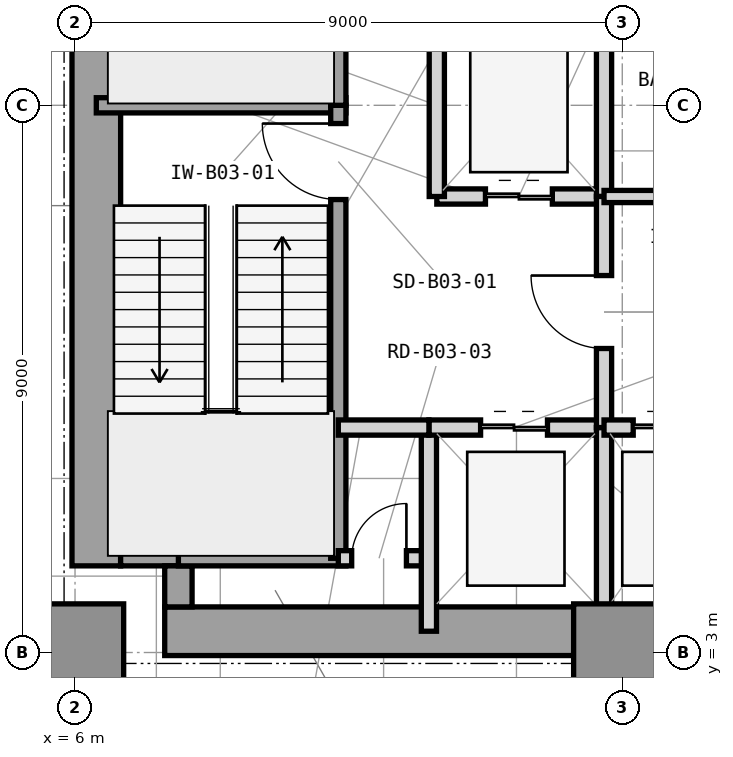
"""IFC4 building model, lengths in metres.
Left out: names, types, materials, properties, quantities, classifications, styles, units other than length and angle.
Written with IfcOpenShell. Run it as: python <this file> out.ifc"""

import sys

from ifc_helpers import new_model, si_unit, direction, frame, frame_2d, origin, origin_2d, place, context, subcontext, project, spatial, rectangle, extrude, element, fill, save


model = new_model("IFC4")
c1 = context("Model", 3, precision=1e-05, world=origin(), true_north=direction((0.0, 1.0)))
c2 = subcontext(c1, "Body", "Model", "MODEL_VIEW")
j1 = project(units=[si_unit("LENGTHUNIT", "METRE"), si_unit("PLANEANGLEUNIT", "RADIAN")], contexts=[c1])
p1 = place(None, origin())
s1 = spatial("IfcSite", under=j1, at=p1, CompositionType="ELEMENT")
p2 = place(p1, origin())
s2 = spatial("IfcBuilding", under=s1, at=p2, CompositionType="ELEMENT")
p3 = place(p2, frame((0.0, 0.0, -13.5)))
s3 = spatial("IfcBuildingStorey", under=s2, at=p3, CompositionType="ELEMENT", Elevation=-13.5)
p4 = place(p3, frame((7.475, 3.35, 0.0), z_axis=(0.0, 0.0, 1.0), x_axis=(1.0, 0.0, 0.0)))
e1 = element("IfcWall", 1, at=p4, inside=s3, PredefinedType="SHEAR", context=c2, shape_type="SweptSolid", body=[
    extrude(rectangle(XDim=16.575, YDim=0.8, at=frame_2d((8.288, 0.0))), origin(), (0.0, 0.0, 1.0), 4.5),
])
p5 = place(p3, frame((6.35, 4.425, 0.0), z_axis=(0.0, 0.0, 1.0), x_axis=(0.0, 1.0, 0.0)))
e2 = element("IfcWall", 2, at=p5, inside=s3, PredefinedType="SHEAR", context=c2, shape_type="SweptSolid", body=[
    extrude(rectangle(XDim=15.15, YDim=0.8, at=frame_2d((7.575, 0.0))), origin(), (0.0, 0.0, 1.0), 4.5),
])
p6 = place(p3, frame((6.75, 4.65, 0.0), z_axis=(0.0, 0.0, 1.0), x_axis=(1.0, 0.0, 0.0)))
e3 = element("IfcWall", 3, at=p6, inside=s3, PredefinedType="SHEAR", context=c2, shape_type="SweptSolid", body=[
    extrude(rectangle(XDim=1.175, YDim=0.45, at=frame_2d((0.587, 0.0))), origin(), (0.0, 0.0, 1.0), 4.5),
])
p7 = place(p3, frame((7.7, 3.75, 0.0), z_axis=(0.0, 0.0, 1.0), x_axis=(0.0, 1.0, 0.0)))
e4 = element("IfcWall", 4, at=p7, inside=s3, PredefinedType="SHEAR", context=c2, shape_type="SweptSolid", body=[
    extrude(rectangle(XDim=0.675, YDim=0.45, at=frame_2d((0.337, 0.0))), origin(), (0.0, 0.0, 1.0), 4.5),
])
for number, where, z_axis, x_axis in (
    (5, (6.0, 3.0, 0.0), (0.0, 0.0, 1.0), (1.0, 0.0, 0.0)),
    (6, (15.0, 3.0, 0.0), (0.0, 0.0, 1.0), (1.0, 0.0, 0.0)),
):
    element("IfcColumn", number, at=place(p3, frame(where, z_axis=z_axis, x_axis=x_axis)), inside=s3, PredefinedType="COLUMN", context=c2, shape_type="SweptSolid", body=[
        extrude(rectangle(XDim=1.6, YDim=1.6, at=origin_2d()), origin(), (0.0, 0.0, 1.0), 4.5),
    ])
p8 = place(p3, frame((6.35, 12.0, 0.0), z_axis=(0.0, 0.0, 1.0), x_axis=(1.0, 0.0, 0.0)))
e7 = element("IfcWall", 7, at=p8, inside=s3, PredefinedType="SHEAR", context=c2, shape_type="SweptSolid", body=[
    extrude(rectangle(XDim=4.105, YDim=0.25, at=frame_2d((2.052, 0.0))), origin(), (0.0, 0.0, 1.0), 4.5),
])
p9 = place(p3, frame((7.7, 4.55, 0.0), z_axis=(0.0, 0.0, 1.0), x_axis=(1.0, 0.0, 0.0)))
e8 = element("IfcWall", 8, at=p9, inside=s3, PredefinedType="SHEAR", context=c2, shape_type="SweptSolid", body=[
    extrude(rectangle(XDim=2.755, YDim=0.25, at=frame_2d((1.377, 0.0))), origin(), (0.0, 0.0, 1.0), 4.5),
])
p10 = place(p3, frame((10.33, 4.55, 0.0), z_axis=(0.0, 0.0, 1.0), x_axis=(0.0, 1.0, 0.0)))
e9 = element("IfcWall", 9, at=p10, inside=s3, PredefinedType="SHEAR", context=c2, shape_type="SweptSolid", body=[
    extrude(rectangle(XDim=7.45, YDim=0.25, at=frame_2d((3.725, 0.0))), origin(), (0.0, 0.0, 1.0), 4.5),
])
p11 = place(p10, frame((5.9, 0.0, 0.0)))
e10 = element("IfcOpeningElement", 10, at=p11, cuts=e9, PredefinedType="OPENING", context=c2, shape_type="SweptSolid", body=[
    extrude(rectangle(XDim=1.25, YDim=2.2, at=frame_2d((0.625, 1.1))), frame((0.0, 0.135, 0.0), z_axis=(0.0, -1.0, 0.0), x_axis=(1.0, 0.0, 0.0)), (0.0, 0.0, 1.0), 0.27),
])
p12 = place(p3, frame((10.33, 12.0, 0.0), z_axis=(0.0, 0.0, 1.0), x_axis=(0.0, 1.0, 0.0)))
e11 = element("IfcWall", 11, at=p12, inside=s3, PredefinedType="SHEAR", context=c2, shape_type="SweptSolid", body=[
    extrude(rectangle(XDim=7.45, YDim=0.25, at=frame_2d((3.725, 0.0))), origin(), (0.0, 0.0, 1.0), 4.5),
])
p13 = place(p12, frame((5.85, 0.0, 0.0)))
e12 = element("IfcOpeningElement", 12, at=p13, cuts=e11, PredefinedType="OPENING", context=c2, shape_type="SweptSolid", body=[
    extrude(rectangle(XDim=1.25, YDim=2.2, at=frame_2d((0.625, 1.1))), frame((0.0, 0.135, 0.0), z_axis=(0.0, -1.0, 0.0), x_axis=(1.0, 0.0, 0.0)), (0.0, 0.0, 1.0), 0.27),
])
p14 = place(p3, frame((10.33, 4.55, 0.0), z_axis=(0.0, 0.0, 1.0), x_axis=(1.0, 0.0, 0.0)))
e13 = element("IfcWall", 13, at=p14, inside=s3, PredefinedType="PARTITIONING", context=c2, shape_type="SweptSolid", body=[
    extrude(rectangle(XDim=1.49, YDim=0.25, at=frame_2d((0.745, 0.0))), origin(), (0.0, 0.0, 1.0), 4.14),
])
p15 = place(p14, frame((0.22, 0.0, 0.0)))
e14 = element("IfcOpeningElement", 14, at=p15, cuts=e13, PredefinedType="OPENING", context=c2, shape_type="SweptSolid", body=[
    extrude(rectangle(XDim=0.9, YDim=2.1, at=frame_2d((0.45, 1.05))), frame((0.0, 0.135, 0.0), z_axis=(0.0, -1.0, 0.0), x_axis=(1.0, 0.0, 0.0)), (0.0, 0.0, 1.0), 0.27),
])
p16 = place(p3, frame((11.82, 3.35, 0.0), z_axis=(0.0, 0.0, 1.0), x_axis=(0.0, 1.0, 0.0)))
e15 = element("IfcWall", 15, at=p16, inside=s3, PredefinedType="PARTITIONING", context=c2, shape_type="SweptSolid", body=[
    extrude(rectangle(XDim=3.35, YDim=0.25, at=frame_2d((1.675, 0.0))), origin(), (0.0, 0.0, 1.0), 4.14),
])
p17 = place(p3, frame((11.82, 6.7, 0.0), z_axis=(0.0, 0.0, 1.0), x_axis=(1.0, 0.0, 0.0)))
e16 = element("IfcWall", 16, at=p17, inside=s3, PredefinedType="PARTITIONING", context=c2, shape_type="SweptSolid", body=[
    extrude(rectangle(XDim=2.88, YDim=0.25, at=frame_2d((1.44, 0.0))), origin(), (0.0, 0.0, 1.0), 3.523),
])
p18 = place(p17, frame((0.85, 0.0, 0.0)))
e17 = element("IfcOpeningElement", 17, at=p18, cuts=e16, PredefinedType="OPENING", context=c2, shape_type="SweptSolid", body=[
    extrude(rectangle(XDim=1.1, YDim=2.25, at=frame_2d((0.55, 1.125))), frame((0.0, 0.135, 0.0), z_axis=(0.0, -1.0, 0.0), x_axis=(1.0, 0.0, 0.0)), (0.0, 0.0, 1.0), 0.27),
])
p19 = place(p3, frame((14.7, 3.35, 0.0), z_axis=(0.0, 0.0, 1.0), x_axis=(0.0, 1.0, 0.0)))
e18 = element("IfcWall", 18, at=p19, inside=s3, PredefinedType="PARTITIONING", context=c2, shape_type="SweptSolid", body=[
    extrude(rectangle(XDim=3.35, YDim=0.25, at=frame_2d((1.675, 0.0))), origin(), (0.0, 0.0, 1.0), 4.14),
])
p20 = place(p3, frame((11.95, 10.5, 0.0), z_axis=(0.0, 0.0, 1.0), x_axis=(1.0, 0.0, 0.0)))
e19 = element("IfcWall", 19, at=p20, inside=s3, PredefinedType="PARTITIONING", context=c2, shape_type="SweptSolid", body=[
    extrude(rectangle(XDim=2.75, YDim=0.25, at=frame_2d((1.375, 0.0))), origin(), (0.0, 0.0, 1.0), 3.523),
])
p21 = place(p20, frame((0.8, 0.0, 0.0)))
e20 = element("IfcOpeningElement", 20, at=p21, cuts=e19, PredefinedType="OPENING", context=c2, shape_type="SweptSolid", body=[
    extrude(rectangle(XDim=1.1, YDim=2.25, at=frame_2d((0.55, 1.125))), frame((0.0, 0.135, 0.0), z_axis=(0.0, -1.0, 0.0), x_axis=(1.0, 0.0, 0.0)), (0.0, 0.0, 1.0), 0.27),
])
for number, where, z_axis, x_axis in (
    (21, (11.95, 10.5, 0.0), (0.0, 0.0, 1.0), (0.0, 1.0, 0.0)),
    (22, (14.7, 10.5, 0.0), (0.0, 0.0, 1.0), (0.0, 1.0, 0.0)),
):
    element("IfcWall", number, at=place(p3, frame(where, z_axis=z_axis, x_axis=x_axis)), inside=s3, PredefinedType="PARTITIONING", context=c2, shape_type="SweptSolid", body=[
        extrude(rectangle(XDim=3.0, YDim=0.25, at=frame_2d((1.5, 0.0))), origin(), (0.0, 0.0, 1.0), 4.14),
    ])
p22 = place(p3, frame((14.7, 6.7, 0.0), z_axis=(0.0, 0.0, 1.0), x_axis=(0.0, 1.0, 0.0)))
e23 = element("IfcWall", 23, at=p22, inside=s3, PredefinedType="PARTITIONING", context=c2, shape_type="SweptSolid", body=[
    extrude(rectangle(XDim=3.8, YDim=0.25, at=frame_2d((1.9, 0.0))), origin(), (0.0, 0.0, 1.0), 4.14),
])
p23 = place(p22, frame((1.3, 0.0, 0.0)))
e24 = element("IfcOpeningElement", 24, at=p23, cuts=e23, PredefinedType="OPENING", context=c2, shape_type="SweptSolid", body=[
    extrude(rectangle(XDim=1.2, YDim=2.2, at=frame_2d((0.6, 1.1))), frame((0.0, 0.135, 0.0), z_axis=(0.0, -1.0, 0.0), x_axis=(1.0, 0.0, 0.0)), (0.0, 0.0, 1.0), 0.27),
])
p24 = place(p3, frame((10.33, 6.7, 0.0), z_axis=(0.0, 0.0, 1.0), x_axis=(1.0, 0.0, 0.0)))
e25 = element("IfcWall", 25, at=p24, inside=s3, PredefinedType="PARTITIONING", context=c2, shape_type="SweptSolid", body=[
    extrude(rectangle(XDim=1.49, YDim=0.25, at=frame_2d((0.745, 0.0))), origin(), (0.0, 0.0, 1.0), 3.523),
])
p25 = place(p3, frame((14.7, 6.7, 0.0), z_axis=(0.0, 0.0, 1.0), x_axis=(1.0, 0.0, 0.0)))
e26 = element("IfcWall", 26, at=p25, inside=s3, PredefinedType="PARTITIONING", context=c2, shape_type="SweptSolid", body=[
    extrude(rectangle(XDim=2.15, YDim=0.25, at=frame_2d((1.075, 0.0))), origin(), (0.0, 0.0, 1.0), 3.523),
])
p26 = place(p25, frame((0.48, 0.0, 0.0)))
e27 = element("IfcOpeningElement", 27, at=p26, cuts=e26, PredefinedType="OPENING", context=c2, shape_type="SweptSolid", body=[
    extrude(rectangle(XDim=1.15, YDim=2.25, at=frame_2d((0.575, 1.125))), frame((0.0, 0.135, 0.0), z_axis=(0.0, -1.0, 0.0), x_axis=(1.0, 0.0, 0.0)), (0.0, 0.0, 1.0), 0.27),
])
p27 = place(p3, frame((14.7, 10.5, 0.0), z_axis=(0.0, 0.0, 1.0), x_axis=(1.0, 0.0, 0.0)))
e28 = element("IfcWall", 28, at=p27, inside=s3, PredefinedType="PARTITIONING", context=c2, shape_type="SweptSolid", body=[
    extrude(rectangle(XDim=8.95, YDim=0.2, at=frame_2d((4.475, 0.0))), origin(), (0.0, 0.0, 1.0), 3.523),
])
p28 = place(p27, frame((3.2, 0.0, 0.0)))
e29 = element("IfcOpeningElement", 29, at=p28, cuts=e28, PredefinedType="OPENING", context=c2, shape_type="SweptSolid", body=[
    extrude(rectangle(XDim=1.6, YDim=2.3, at=frame_2d((0.8, 1.15))), frame((0.0, 0.11, 0.0), z_axis=(0.0, -1.0, 0.0), x_axis=(1.0, 0.0, 0.0)), (0.0, 0.0, 1.0), 0.22),
])
p29 = place(p11, origin())
e30 = element("IfcDoor", 30, at=p29, inside=s3, OperationType="SINGLE_SWING_RIGHT", PredefinedType="DOOR", context=c2, shape_type="SweptSolid", body=[
    extrude(rectangle(XDim=1.25, YDim=2.2, at=frame_2d((0.625, 1.1))), frame((0.0, 0.025, 0.0), z_axis=(0.0, -1.0, 0.0), x_axis=(1.0, 0.0, 0.0)), (0.0, 0.0, 1.0), 0.05),
])
fill(e10, e30)
p30 = place(p15, origin())
e31 = element("IfcDoor", 31, at=p30, inside=s3, OperationType="SINGLE_SWING_RIGHT", PredefinedType="TRAPDOOR", context=c2, shape_type="SweptSolid", body=[
    extrude(rectangle(XDim=0.9, YDim=2.1, at=frame_2d((0.45, 1.05))), frame((0.0, 0.025, 0.0), z_axis=(0.0, -1.0, 0.0), x_axis=(1.0, 0.0, 0.0)), (0.0, 0.0, 1.0), 0.05),
])
fill(e14, e31)
p31 = place(p18, origin())
e32 = element("IfcDoor", 32, at=p31, inside=s3, OperationType="DOUBLE_DOOR_SLIDING", PredefinedType="DOOR", context=c2, shape_type="SweptSolid", body=[
    extrude(rectangle(XDim=1.1, YDim=2.25, at=frame_2d((0.55, 1.125))), frame((0.0, 0.025, 0.0), z_axis=(0.0, -1.0, 0.0), x_axis=(1.0, 0.0, 0.0)), (0.0, 0.0, 1.0), 0.05),
])
fill(e17, e32)
p32 = place(p21, origin())
e33 = element("IfcDoor", 33, at=p32, inside=s3, OperationType="DOUBLE_DOOR_SLIDING", PredefinedType="DOOR", context=c2, shape_type="SweptSolid", body=[
    extrude(rectangle(XDim=1.1, YDim=2.25, at=frame_2d((0.55, 1.125))), frame((0.0, 0.025, 0.0), z_axis=(0.0, -1.0, 0.0), x_axis=(1.0, 0.0, 0.0)), (0.0, 0.0, 1.0), 0.05),
])
fill(e20, e33)
p33 = place(p23, origin())
e34 = element("IfcDoor", 34, at=p33, inside=s3, OperationType="SINGLE_SWING_RIGHT", PredefinedType="DOOR", context=c2, shape_type="SweptSolid", body=[
    extrude(rectangle(XDim=1.2, YDim=2.2, at=frame_2d((0.6, 1.1))), frame((0.0, 0.025, 0.0), z_axis=(0.0, -1.0, 0.0), x_axis=(1.0, 0.0, 0.0)), (0.0, 0.0, 1.0), 0.05),
])
fill(e24, e34)
p34 = place(p26, origin())
e35 = element("IfcDoor", 35, at=p34, inside=s3, OperationType="DOUBLE_DOOR_SLIDING", PredefinedType="DOOR", context=c2, shape_type="SweptSolid", body=[
    extrude(rectangle(XDim=1.15, YDim=2.25, at=frame_2d((0.575, 1.125))), frame((0.0, 0.025, 0.0), z_axis=(0.0, -1.0, 0.0), x_axis=(1.0, 0.0, 0.0)), (0.0, 0.0, 1.0), 0.05),
])
fill(e27, e35)
save(model, sys.argv[1])
